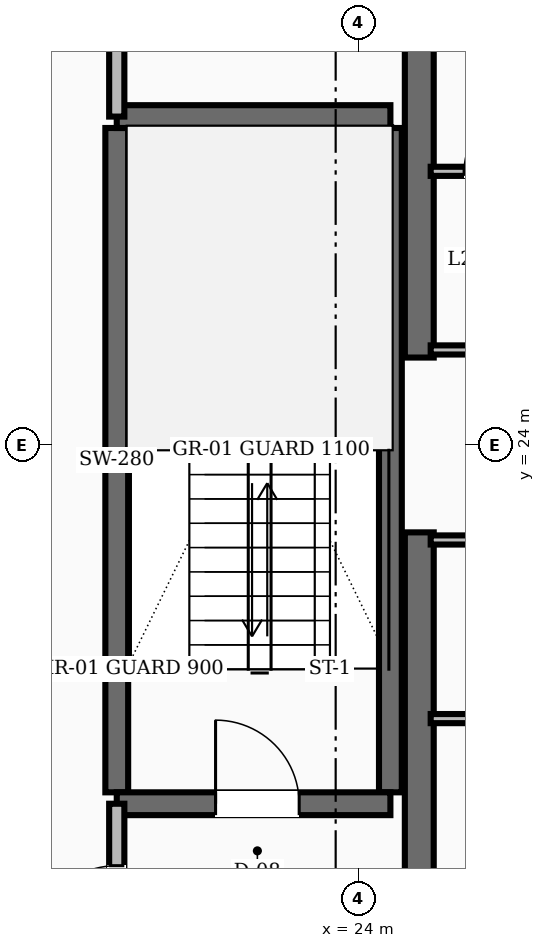
"""IFC4 building model, lengths in metres.
Left out: names, types, materials, properties, quantities, classifications, styles, units other than length and angle.
Written with IfcOpenShell. Run it as: python <this file> out.ifc"""

import sys

from ifc_helpers import new_model, si_unit, direction, frame, frame_2d, origin, place, context, subcontext, project, spatial, rectangle, extrude, element, fill, save


model = new_model("IFC4")
c1 = context("Model", 3, precision=1e-05, world=origin(), true_north=direction((0.0, 1.0)))
c2 = subcontext(c1, "Body", "Model", "MODEL_VIEW")
j1 = project(units=[si_unit("LENGTHUNIT", "METRE"), si_unit("PLANEANGLEUNIT", "RADIAN")], contexts=[c1])
p1 = place(None, origin())
s1 = spatial("IfcSite", under=j1, at=p1, CompositionType="ELEMENT")
p2 = place(p1, origin())
s2 = spatial("IfcBuilding", under=s1, at=p2, CompositionType="ELEMENT")
p3 = place(p2, frame((0.0, 0.0, 95.2)))
s3 = spatial("IfcBuildingStorey", under=s2, at=p3, CompositionType="ELEMENT", Elevation=95.2)
for number, where, z_axis, x_axis in (
    (1, (24.8, 16.55, 0.0), (0.0, 0.0, 1.0), (0.0, 1.0, 0.0)),
    (2, (24.8, 25.15, 0.0), (0.0, 0.0, 1.0), (0.0, 1.0, 0.0)),
):
    element("IfcWall", number, at=place(p3, frame(where, z_axis=z_axis, x_axis=x_axis)), inside=s3, PredefinedType="SHEAR", context=c2, shape_type="SweptSolid", body=[
        extrude(rectangle(XDim=6.3, YDim=0.38, at=frame_2d((3.15, 0.0))), origin(), (0.0, 0.0, 1.0), 3.6),
    ])
for number, where, z_axis, x_axis in (
    (3, (20.82, 19.43, 0.0), (0.0, 0.0, 1.0), (0.0, 1.0, 0.0)),
    (4, (24.42, 19.43, 0.0), (0.0, 0.0, 1.0), (0.0, 1.0, 0.0)),
):
    element("IfcWall", number, at=place(p3, frame(where, z_axis=z_axis, x_axis=x_axis)), inside=s3, PredefinedType="SHEAR", context=c2, shape_type="SweptSolid", body=[
        extrude(rectangle(XDim=8.74, YDim=0.3, at=frame_2d((4.37, 0.0))), origin(), (0.0, 0.0, 1.0), 3.6),
    ])
p4 = place(p3, frame((20.82, 19.28, 0.0), z_axis=(0.0, 0.0, 1.0), x_axis=(1.0, 0.0, 0.0)))
e5 = element("IfcWall", 5, at=p4, inside=s3, PredefinedType="SHEAR", context=c2, shape_type="SweptSolid", body=[
    extrude(rectangle(XDim=3.6, YDim=0.3, at=frame_2d((1.8, 0.0))), origin(), (0.0, 0.0, 1.0), 3.6),
])
p5 = place(p4, frame((1.3, 0.0, 0.0)))
e6 = element("IfcOpeningElement", 6, at=p5, cuts=e5, PredefinedType="OPENING", context=c2, shape_type="SweptSolid", body=[
    extrude(rectangle(XDim=1.1, YDim=2.1, at=frame_2d((0.55, 1.05))), frame((0.0, 0.16, 0.0), z_axis=(0.0, -1.0, 0.0), x_axis=(1.0, 0.0, 0.0)), (0.0, 0.0, 1.0), 0.32),
])
p6 = place(p3, frame((20.82, 28.32, 0.0), z_axis=(0.0, 0.0, 1.0), x_axis=(1.0, 0.0, 0.0)))
e7 = element("IfcWall", 7, at=p6, inside=s3, PredefinedType="SHEAR", context=c2, shape_type="SweptSolid", body=[
    extrude(rectangle(XDim=3.6, YDim=0.3, at=frame_2d((1.8, 0.0))), origin(), (0.0, 0.0, 1.0), 3.6),
])
p7 = place(p3, frame((20.82, 16.55, 0.0), z_axis=(0.0, 0.0, 1.0), x_axis=(0.0, 1.0, 0.0)))
e8 = element("IfcWall", 8, at=p7, inside=s3, PredefinedType="SOLIDWALL", context=c2, shape_type="SweptSolid", body=[
    extrude(rectangle(XDim=2.73, YDim=0.2, at=frame_2d((1.365, 0.0))), origin(), (0.0, 0.0, 1.0), 2.71),
])
p8 = place(p7, frame((0.815, 0.0, 0.0)))
e9 = element("IfcOpeningElement", 9, at=p8, cuts=e8, PredefinedType="OPENING", context=c2, shape_type="SweptSolid", body=[
    extrude(rectangle(XDim=1.1, YDim=2.1, at=frame_2d((0.55, 1.05))), frame((0.0, 0.11, 0.0), z_axis=(0.0, -1.0, 0.0), x_axis=(1.0, 0.0, 0.0)), (0.0, 0.0, 1.0), 0.22),
])
p9 = place(p3, frame((20.82, 28.32, 0.0), z_axis=(0.0, 0.0, 1.0), x_axis=(0.0, 1.0, 0.0)))
e10 = element("IfcWall", 10, at=p9, inside=s3, PredefinedType="SOLIDWALL", context=c2, shape_type="SweptSolid", body=[
    extrude(rectangle(XDim=3.13, YDim=0.2, at=frame_2d((1.565, 0.0))), origin(), (0.0, 0.0, 1.0), 2.71),
])
p10 = place(p9, frame((1.09, 0.0, 0.0)))
e11 = element("IfcOpeningElement", 11, at=p10, cuts=e10, PredefinedType="OPENING", context=c2, shape_type="SweptSolid", body=[
    extrude(rectangle(XDim=0.95, YDim=2.1, at=frame_2d((0.475, 1.05))), frame((0.0, 0.11, 0.0), z_axis=(0.0, -1.0, 0.0), x_axis=(1.0, 0.0, 0.0)), (0.0, 0.0, 1.0), 0.22),
])
p11 = place(p3, frame((24.95, 25.25, 0.0), z_axis=(0.0, 0.0, 1.0), x_axis=(1.0, 0.0, 0.0)))
e12 = element("IfcWall", 12, at=p11, inside=s3, PredefinedType="PARTITIONING", context=c2, shape_type="SweptSolid", body=[
    extrude(rectangle(XDim=3.2, YDim=0.12, at=frame_2d((1.6, 0.0))), origin(), (0.0, 0.0, 1.0), 2.71),
])
p12 = place(p11, frame((1.125, 0.0, 0.0)))
e13 = element("IfcOpeningElement", 13, at=p12, cuts=e12, PredefinedType="OPENING", context=c2, shape_type="SweptSolid", body=[
    extrude(rectangle(XDim=0.95, YDim=2.1, at=frame_2d((0.475, 1.05))), frame((0.0, 0.07, 0.0), z_axis=(0.0, -1.0, 0.0), x_axis=(1.0, 0.0, 0.0)), (0.0, 0.0, 1.0), 0.14),
])
p13 = place(p3, frame((24.95, 22.75, 0.0), z_axis=(0.0, 0.0, 1.0), x_axis=(1.0, 0.0, 0.0)))
e14 = element("IfcWall", 14, at=p13, inside=s3, PredefinedType="PARTITIONING", context=c2, shape_type="SweptSolid", body=[
    extrude(rectangle(XDim=3.2, YDim=0.12, at=frame_2d((1.6, 0.0))), origin(), (0.0, 0.0, 1.0), 2.71),
])
p14 = place(p13, frame((1.125, 0.0, 0.0)))
e15 = element("IfcOpeningElement", 15, at=p14, cuts=e14, PredefinedType="OPENING", context=c2, shape_type="SweptSolid", body=[
    extrude(rectangle(XDim=0.95, YDim=2.1, at=frame_2d((0.475, 1.05))), frame((0.0, 0.07, 0.0), z_axis=(0.0, -1.0, 0.0), x_axis=(1.0, 0.0, 0.0)), (0.0, 0.0, 1.0), 0.14),
])
p15 = place(p3, frame((24.95, 27.6, 0.0), z_axis=(0.0, 0.0, 1.0), x_axis=(1.0, 0.0, 0.0)))
e16 = element("IfcWall", 16, at=p15, inside=s3, PredefinedType="PARTITIONING", context=c2, shape_type="SweptSolid", body=[
    extrude(rectangle(XDim=3.2, YDim=0.12, at=frame_2d((1.6, 0.0))), origin(), (0.0, 0.0, 1.0), 2.71),
])
p16 = place(p15, frame((0.44, 0.0, 0.0)))
e17 = element("IfcOpeningElement", 17, at=p16, cuts=e16, PredefinedType="OPENING", context=c2, shape_type="SweptSolid", body=[
    extrude(rectangle(XDim=0.86, YDim=2.1, at=frame_2d((0.43, 1.05))), frame((0.0, 0.07, 0.0), z_axis=(0.0, -1.0, 0.0), x_axis=(1.0, 0.0, 0.0)), (0.0, 0.0, 1.0), 0.14),
])
p17 = place(p15, frame((1.9, 0.0, 0.0)))
e18 = element("IfcOpeningElement", 18, at=p17, cuts=e16, PredefinedType="OPENING", context=c2, shape_type="SweptSolid", body=[
    extrude(rectangle(XDim=0.86, YDim=2.1, at=frame_2d((0.43, 1.05))), frame((0.0, 0.07, 0.0), z_axis=(0.0, -1.0, 0.0), x_axis=(1.0, 0.0, 0.0)), (0.0, 0.0, 1.0), 0.14),
])
p18 = place(p3, frame((24.95, 20.4, 0.0), z_axis=(0.0, 0.0, 1.0), x_axis=(1.0, 0.0, 0.0)))
e19 = element("IfcWall", 19, at=p18, inside=s3, PredefinedType="PARTITIONING", context=c2, shape_type="SweptSolid", body=[
    extrude(rectangle(XDim=3.2, YDim=0.12, at=frame_2d((1.6, 0.0))), origin(), (0.0, 0.0, 1.0), 2.71),
])
p19 = place(p18, frame((1.125, 0.0, 0.0)))
e20 = element("IfcOpeningElement", 20, at=p19, cuts=e19, PredefinedType="OPENING", context=c2, shape_type="SweptSolid", body=[
    extrude(rectangle(XDim=0.95, YDim=2.1, at=frame_2d((0.475, 1.05))), frame((0.0, 0.07, 0.0), z_axis=(0.0, -1.0, 0.0), x_axis=(1.0, 0.0, 0.0)), (0.0, 0.0, 1.0), 0.14),
])
p20 = place(p5, origin())
e21 = element("IfcDoor", 21, at=p20, inside=s3, OperationType="SINGLE_SWING_LEFT", PredefinedType="DOOR", context=c2, shape_type="SweptSolid", body=[
    extrude(rectangle(XDim=1.1, YDim=2.1, at=frame_2d((0.55, 1.05))), frame((0.0, 0.025, 0.0), z_axis=(0.0, -1.0, 0.0), x_axis=(1.0, 0.0, 0.0)), (0.0, 0.0, 1.0), 0.05),
])
fill(e6, e21)
p21 = place(p8, origin())
e22 = element("IfcDoor", 22, at=p21, inside=s3, OperationType="SINGLE_SWING_LEFT", PredefinedType="DOOR", context=c2, shape_type="SweptSolid", body=[
    extrude(rectangle(XDim=1.1, YDim=2.1, at=frame_2d((0.55, 1.05))), frame((0.0, 0.025, 0.0), z_axis=(0.0, -1.0, 0.0), x_axis=(1.0, 0.0, 0.0)), (0.0, 0.0, 1.0), 0.05),
])
fill(e9, e22)
p22 = place(p16, origin())
e23 = element("IfcDoor", 23, at=p22, inside=s3, OperationType="SINGLE_SWING_RIGHT", PredefinedType="DOOR", context=c2, shape_type="SweptSolid", body=[
    extrude(rectangle(XDim=0.86, YDim=2.1, at=frame_2d((0.43, 1.05))), frame((0.0, 0.025, 0.0), z_axis=(0.0, -1.0, 0.0), x_axis=(1.0, 0.0, 0.0)), (0.0, 0.0, 1.0), 0.05),
])
fill(e17, e23)
save(model, sys.argv[1])
